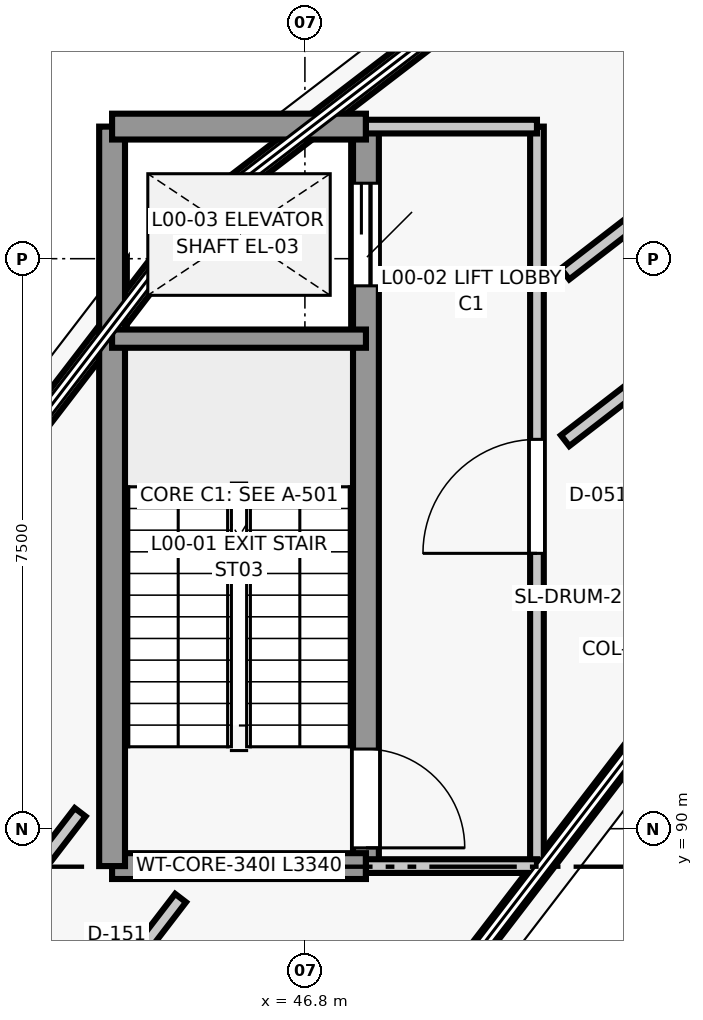
"""IFC4 building model, lengths in metres.
Left out: names, types, materials, properties, quantities, classifications, styles, units other than length and angle.
Written with IfcOpenShell. Run it as: python <this file> out.ifc"""

import sys

from ifc_helpers import new_model, si_unit, direction, frame, frame_2d, origin, place, context, subcontext, project, spatial, rectangle, extrude, element, fill, save


model = new_model("IFC4")
c1 = context("Model", 3, precision=1e-05, world=origin(), true_north=direction((0.0, 1.0)))
c2 = subcontext(c1, "Body", "Model", "MODEL_VIEW")
j1 = project(units=[si_unit("LENGTHUNIT", "METRE"), si_unit("PLANEANGLEUNIT", "RADIAN")], contexts=[c1])
p1 = place(None, origin())
s1 = spatial("IfcSite", under=j1, at=p1, CompositionType="ELEMENT")
p2 = place(p1, origin())
s2 = spatial("IfcBuilding", under=s1, at=p2, CompositionType="ELEMENT")
p3 = place(p2, origin())
s3 = spatial("IfcBuildingStorey", under=s2, at=p3, CompositionType="ELEMENT", Elevation=0.0)
p4 = place(p3, frame((45.402, 98.098, 0.0), z_axis=(0.0, 0.0, 1.0), x_axis=(0.793347191248, 0.608769442514, 0.0)))
e1 = element("IfcWall", 1, at=p4, inside=s3, PredefinedType="STANDARD", context=c2, shape_type="SweptSolid", body=[
    extrude(rectangle(XDim=11.587, YDim=0.28, at=frame_2d((5.793, 0.0))), origin(), (0.0, 0.0, 1.0), 0.82),
])
p5 = place(p3, frame((38.436, 89.019, 0.0), z_axis=(0.0, 0.0, 1.0), x_axis=(0.608753523874, 0.793359406052, 0.0)))
e2 = element("IfcWall", 2, at=p5, inside=s3, PredefinedType="STANDARD", context=c2, shape_type="SweptSolid", body=[
    extrude(rectangle(XDim=11.444, YDim=0.28, at=frame_2d((5.722, 0.0))), origin(), (0.0, 0.0, 1.0), 0.35),
])
p6 = place(p3, frame((51.481, 91.524, 0.0), z_axis=(0.0, 0.0, 1.0), x_axis=(-0.608769580289, -0.793347085527, 0.0)))
e3 = element("IfcWall", 3, at=p6, inside=s3, PredefinedType="STANDARD", context=c2, shape_type="SweptSolid", body=[
    extrude(rectangle(XDim=9.005, YDim=0.25, at=frame_2d((4.502, 0.0))), origin(), (0.0, 0.0, 1.0), 0.35),
])
p7 = place(p3, frame((47.603, 99.238, 0.0), z_axis=(0.0, 0.0, 1.0), x_axis=(0.0, -1.0, 0.0)))
e4 = element("IfcWall", 4, at=p7, inside=s3, PredefinedType="SHEAR", context=c2, shape_type="SweptSolid", body=[
    extrude(rectangle(XDim=9.73, YDim=0.34, at=frame_2d((4.865, 0.0))), origin(), (0.0, 0.0, 1.0), 4.5),
])
p8 = place(p7, frame((8.19, 0.0, 0.0)))
e5 = element("IfcOpeningElement", 5, at=p8, cuts=e4, PredefinedType="OPENING", context=c2, shape_type="SweptSolid", body=[
    extrude(rectangle(XDim=1.3, YDim=2.15, at=frame_2d((0.65, 1.075))), frame((0.0, 0.18, 0.0), z_axis=(0.0, -1.0, 0.0), x_axis=(1.0, 0.0, 0.0)), (0.0, 0.0, 1.0), 0.36),
])
p9 = place(p7, frame((0.745, 0.0, 0.0)))
e6 = element("IfcOpeningElement", 6, at=p9, cuts=e4, PredefinedType="OPENING", context=c2, shape_type="SweptSolid", body=[
    extrude(rectangle(XDim=1.35, YDim=2.15, at=frame_2d((0.675, 1.075))), frame((0.0, 0.18, 0.0), z_axis=(0.0, -1.0, 0.0), x_axis=(1.0, 0.0, 0.0)), (0.0, 0.0, 1.0), 0.36),
])
p10 = place(p3, frame((47.603, 89.508, 0.0), z_axis=(0.0, 0.0, 1.0), x_axis=(-1.0, 0.0, 0.0)))
e7 = element("IfcWall", 7, at=p10, inside=s3, PredefinedType="SHEAR", context=c2, shape_type="SweptSolid", body=[
    extrude(rectangle(XDim=3.34, YDim=0.34, at=frame_2d((1.67, 0.0))), origin(), (0.0, 0.0, 1.0), 4.5),
])
p11 = place(p3, frame((44.263, 89.508, 0.0), z_axis=(0.0, 0.0, 1.0), x_axis=(0.0, 1.0, 0.0)))
e8 = element("IfcWall", 8, at=p11, inside=s3, PredefinedType="SHEAR", context=c2, shape_type="SweptSolid", body=[
    extrude(rectangle(XDim=9.73, YDim=0.34, at=frame_2d((4.865, 0.0))), origin(), (0.0, 0.0, 1.0), 4.5),
])
p12 = place(p3, frame((44.263, 99.238, 0.0), z_axis=(0.0, 0.0, 1.0), x_axis=(1.0, 0.0, 0.0)))
e9 = element("IfcWall", 9, at=p12, inside=s3, PredefinedType="SHEAR", context=c2, shape_type="SweptSolid", body=[
    extrude(rectangle(XDim=3.34, YDim=0.34, at=frame_2d((1.67, 0.0))), origin(), (0.0, 0.0, 1.0), 4.5),
])
p13 = place(p3, frame((47.603, 96.448, 0.0), z_axis=(0.0, 0.0, 1.0), x_axis=(-1.0, 0.0, 0.0)))
e10 = element("IfcWall", 10, at=p13, inside=s3, PredefinedType="SHEAR", context=c2, shape_type="SweptSolid", body=[
    extrude(rectangle(XDim=3.34, YDim=0.24, at=frame_2d((1.67, 0.0))), origin(), (0.0, 0.0, 1.0), 4.5),
])
p14 = place(p3, frame((49.853, 89.508, 0.0), z_axis=(0.0, 0.0, 1.0), x_axis=(0.0, 1.0, 0.0)))
e11 = element("IfcWall", 11, at=p14, inside=s3, PredefinedType="PARTITIONING", context=c2, shape_type="SweptSolid", body=[
    extrude(rectangle(XDim=9.73, YDim=0.18, at=frame_2d((4.865, 0.0))), origin(), (0.0, 0.0, 1.0), 4.255),
])
p15 = place(p14, frame((4.115, 0.0, 0.0)))
e12 = element("IfcOpeningElement", 12, at=p15, cuts=e11, PredefinedType="OPENING", context=c2, shape_type="SweptSolid", body=[
    extrude(rectangle(XDim=1.5, YDim=2.15, at=frame_2d((0.75, 1.075))), frame((0.0, 0.1, 0.0), z_axis=(0.0, -1.0, 0.0), x_axis=(1.0, 0.0, 0.0)), (0.0, 0.0, 1.0), 0.2),
])
for number, where, z_axis, x_axis in (
    (13, (47.603, 89.508, 0.0), (0.0, 0.0, 1.0), (1.0, 0.0, 0.0)),
    (14, (47.603, 99.238, 0.0), (0.0, 0.0, 1.0), (1.0, 0.0, 0.0)),
):
    element("IfcWall", number, at=place(p3, frame(where, z_axis=z_axis, x_axis=x_axis)), inside=s3, PredefinedType="PARTITIONING", context=c2, shape_type="SweptSolid", body=[
        extrude(rectangle(XDim=2.25, YDim=0.18, at=frame_2d((1.125, 0.0))), origin(), (0.0, 0.0, 1.0), 4.255),
    ])
p16 = place(p3, frame((56.575, 102.205, 0.0), z_axis=(0.0, 0.0, 1.0), x_axis=(-0.791414761664, -0.61127953918, 0.0)))
e15 = element("IfcWall", 15, at=p16, inside=s3, PredefinedType="PARTITIONING", context=c2, shape_type="SweptSolid", body=[
    extrude(rectangle(XDim=8.026, YDim=0.18, at=frame_2d((4.013, 0.0))), origin(), (0.0, 0.0, 1.0), 4.255),
])
p17 = place(p16, frame((3.538, 0.0, 0.0)))
e16 = element("IfcOpeningElement", 16, at=p17, cuts=e15, PredefinedType="OPENING", context=c2, shape_type="SweptSolid", body=[
    extrude(rectangle(XDim=0.95, YDim=2.1, at=frame_2d((0.475, 1.05))), frame((0.0, 0.1, 0.0), z_axis=(0.0, -1.0, 0.0), x_axis=(1.0, 0.0, 0.0)), (0.0, 0.0, 1.0), 0.2),
])
p18 = place(p3, frame((57.457, 100.693, 0.0), z_axis=(0.0, 0.0, 1.0), x_axis=(-0.79142007835, -0.611272655683, 0.0)))
e17 = element("IfcWall", 17, at=p18, inside=s3, PredefinedType="PARTITIONING", context=c2, shape_type="SweptSolid", body=[
    extrude(rectangle(XDim=9.141, YDim=0.18, at=frame_2d((4.571, 0.0))), origin(), (0.0, 0.0, 1.0), 4.255),
])
p19 = place(p18, frame((4.045, 0.0, 0.0)))
e18 = element("IfcOpeningElement", 18, at=p19, cuts=e17, PredefinedType="OPENING", context=c2, shape_type="SweptSolid", body=[
    extrude(rectangle(XDim=1.05, YDim=2.1, at=frame_2d((0.525, 1.05))), frame((0.0, 0.1, 0.0), z_axis=(0.0, -1.0, 0.0), x_axis=(1.0, 0.0, 0.0)), (0.0, 0.0, 1.0), 0.2),
])
p20 = place(p3, frame((43.843, 90.217, 0.0), z_axis=(0.0, 0.0, 1.0), x_axis=(-0.608738105254, -0.793371236693, 0.0)))
e19 = element("IfcWall", 19, at=p20, inside=s3, PredefinedType="PARTITIONING", context=c2, shape_type="SweptSolid", body=[
    extrude(rectangle(XDim=4.296, YDim=0.18, at=frame_2d((2.148, 0.0))), origin(), (0.0, 0.0, 1.0), 4.255),
])
p21 = place(p20, frame((1.548, 0.0, 0.0)))
e20 = element("IfcOpeningElement", 20, at=p21, cuts=e19, PredefinedType="OPENING", context=c2, shape_type="SweptSolid", body=[
    extrude(rectangle(XDim=1.2, YDim=2.15, at=frame_2d((0.6, 1.075))), frame((0.0, 0.1, 0.0), z_axis=(0.0, -1.0, 0.0), x_axis=(1.0, 0.0, 0.0)), (0.0, 0.0, 1.0), 0.2),
])
p22 = place(p3, frame((45.164, 89.088, 0.0), z_axis=(0.0, 0.0, 1.0), x_axis=(-0.608788255247, -0.793332755074, 0.0)))
e21 = element("IfcWall", 21, at=p22, inside=s3, PredefinedType="PARTITIONING", context=c2, shape_type="SweptSolid", body=[
    extrude(rectangle(XDim=3.979, YDim=0.18, at=frame_2d((1.99, 0.0))), origin(), (0.0, 0.0, 1.0), 4.255),
])
p23 = place(p22, frame((1.24, 0.0, 0.0)))
e22 = element("IfcOpeningElement", 22, at=p23, cuts=e21, PredefinedType="OPENING", context=c2, shape_type="SweptSolid", body=[
    extrude(rectangle(XDim=1.5, YDim=2.15, at=frame_2d((0.75, 1.075))), frame((0.0, 0.1, 0.0), z_axis=(0.0, -1.0, 0.0), x_axis=(1.0, 0.0, 0.0)), (0.0, 0.0, 1.0), 0.2),
])
p24 = place(p8, origin())
e23 = element("IfcDoor", 23, at=p24, inside=s3, OperationType="SINGLE_SWING_RIGHT", PredefinedType="DOOR", context=c2, shape_type="SweptSolid", body=[
    extrude(rectangle(XDim=1.3, YDim=2.15, at=frame_2d((0.65, 1.075))), frame((0.0, 0.025, 0.0), z_axis=(0.0, -1.0, 0.0), x_axis=(1.0, 0.0, 0.0)), (0.0, 0.0, 1.0), 0.05),
])
fill(e5, e23)
p25 = place(p9, origin())
e24 = element("IfcDoor", 24, at=p25, inside=s3, OperationType="SLIDING_TO_LEFT", PredefinedType="DOOR", context=c2, shape_type="SweptSolid", body=[
    extrude(rectangle(XDim=1.35, YDim=2.15, at=frame_2d((0.675, 1.075))), frame((0.0, 0.025, 0.0), z_axis=(0.0, -1.0, 0.0), x_axis=(1.0, 0.0, 0.0)), (0.0, 0.0, 1.0), 0.05),
])
fill(e6, e24)
p26 = place(p15, origin())
e25 = element("IfcDoor", 25, at=p26, inside=s3, OperationType="SINGLE_SWING_LEFT", PredefinedType="DOOR", context=c2, shape_type="SweptSolid", body=[
    extrude(rectangle(XDim=1.5, YDim=2.15, at=frame_2d((0.75, 1.075))), frame((0.0, 0.025, 0.0), z_axis=(0.0, -1.0, 0.0), x_axis=(1.0, 0.0, 0.0)), (0.0, 0.0, 1.0), 0.05),
])
fill(e12, e25)
save(model, sys.argv[1])
